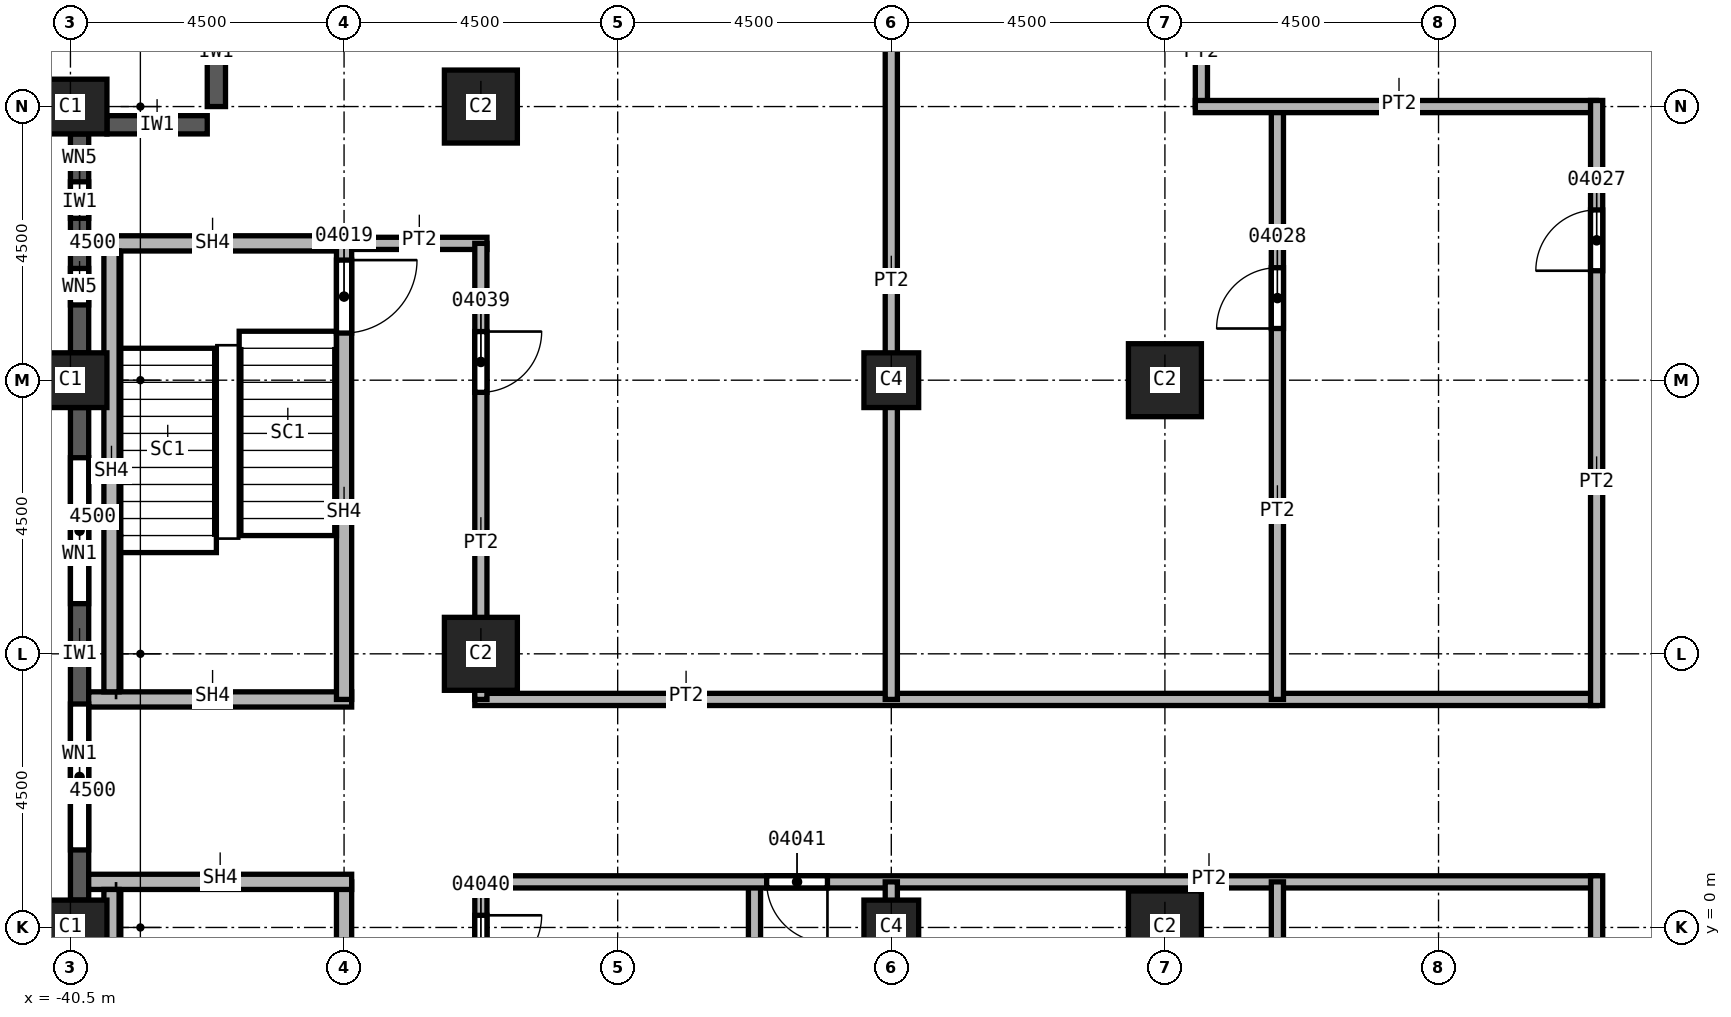
"""IFC4 building model, lengths in metres.
Left out: names, types, materials, properties, quantities, classifications, styles, units other than length and angle.
Written with IfcOpenShell. Run it as: python <this file> out.ifc"""

import sys

from ifc_helpers import new_model, si_unit, direction, frame, frame_2d, origin, origin_2d, place, context, subcontext, project, spatial, rectangle, extrude, element, fill, save


model = new_model("IFC4")
c1 = context("Model", 3, precision=1e-05, world=origin(), true_north=direction((0.0, 1.0)))
c2 = subcontext(c1, "Body", "Model", "MODEL_VIEW")
j1 = project(units=[si_unit("LENGTHUNIT", "METRE"), si_unit("PLANEANGLEUNIT", "RADIAN")], contexts=[c1])
p1 = place(None, origin())
s1 = spatial("IfcSite", under=j1, at=p1, CompositionType="ELEMENT")
p2 = place(p1, origin())
s2 = spatial("IfcBuilding", under=s1, at=p2, CompositionType="ELEMENT")
p3 = place(p2, frame((0.0, 0.0, 104.0)))
s3 = spatial("IfcBuildingStorey", under=s2, at=p3, CompositionType="ELEMENT", Elevation=104.0)
for number, where, z_axis, x_axis in (
    (1, (-40.5, 0.0, 0.0), (0.0, 0.0, 1.0), (0.0, 1.0, 0.0)),
    (2, (-40.5, 9.0, 0.0), (0.0, 0.0, 1.0), (0.0, 1.0, 0.0)),
    (3, (-40.5, 13.5, 0.0), (0.0, 0.0, 1.0), (0.0, 1.0, 0.0)),
):
    element("IfcColumn", number, at=place(p3, frame(where, z_axis=z_axis, x_axis=x_axis)), inside=s3, PredefinedType="COLUMN", context=c2, shape_type="SweptSolid", body=[
        extrude(rectangle(XDim=0.9, YDim=1.2, at=origin_2d()), origin(), (0.0, 0.0, 1.0), 3.7),
    ])
for number, where, z_axis, x_axis in (
    (4, (-33.75, 4.5, 0.0), (0.0, 0.0, 1.0), (1.0, 0.0, 0.0)),
    (5, (-33.75, 13.5, 0.0), (0.0, 0.0, 1.0), (1.0, 0.0, 0.0)),
    (6, (-22.5, 0.0, 0.0), (0.0, 0.0, 1.0), (1.0, 0.0, 0.0)),
    (7, (-22.5, 9.0, 0.0), (0.0, 0.0, 1.0), (1.0, 0.0, 0.0)),
):
    element("IfcColumn", number, at=place(p3, frame(where, z_axis=z_axis, x_axis=x_axis)), inside=s3, PredefinedType="COLUMN", context=c2, shape_type="SweptSolid", body=[
        extrude(rectangle(XDim=1.2, YDim=1.2, at=origin_2d()), origin(), (0.0, 0.0, 1.0), 3.7),
    ])
for number, where, z_axis, x_axis in (
    (8, (-27.0, 0.0, 0.0), (0.0, 0.0, 1.0), (1.0, 0.0, 0.0)),
    (9, (-27.0, 9.0, 0.0), (0.0, 0.0, 1.0), (1.0, 0.0, 0.0)),
):
    element("IfcColumn", number, at=place(p3, frame(where, z_axis=z_axis, x_axis=x_axis)), inside=s3, PredefinedType="COLUMN", context=c2, shape_type="SweptSolid", body=[
        extrude(rectangle(XDim=0.9, YDim=0.9, at=origin_2d()), origin(), (0.0, 0.0, 1.0), 3.7),
    ])
p4 = place(p3, frame((-38.1, 15.3, 0.0), z_axis=(0.0, 0.0, 1.0), x_axis=(0.0, -1.0, 0.0)))
e10 = element("IfcWall", 10, at=p4, inside=s3, PredefinedType="SOLIDWALL", context=c2, shape_type="SweptSolid", body=[
    extrude(rectangle(XDim=1.8, YDim=0.3, at=frame_2d((0.9, 0.0))), origin(), (0.0, 0.0, 1.0), 3.1),
])
p5 = place(p3, frame((-39.9, 13.2, 0.0), z_axis=(0.0, 0.0, 1.0), x_axis=(1.0, 0.0, 0.0)))
e11 = element("IfcWall", 11, at=p5, inside=s3, PredefinedType="SOLIDWALL", context=c2, shape_type="SweptSolid", body=[
    extrude(rectangle(XDim=1.65, YDim=0.3, at=frame_2d((0.825, 0.0))), origin(), (0.0, 0.0, 1.0), 3.1),
])
p6 = place(p3, frame((-40.35, 13.05, 0.0), z_axis=(0.0, 0.0, 1.0), x_axis=(0.0, -1.0, 0.0)))
e12 = element("IfcWall", 12, at=p6, inside=s3, PredefinedType="SOLIDWALL", context=c2, shape_type="SweptSolid", body=[
    extrude(rectangle(XDim=3.6, YDim=0.3, at=frame_2d((1.8, 0.0))), origin(), (0.0, 0.0, 1.0), 3.1),
])
p7 = place(p6, frame((0.788, 0.0, 0.8)))
e13 = element("IfcOpeningElement", 13, at=p7, cuts=e12, PredefinedType="OPENING", context=c2, shape_type="SweptSolid", body=[
    extrude(rectangle(XDim=0.6, YDim=1.95, at=frame_2d((0.3, 0.975))), frame((0.0, 0.15, 0.0), z_axis=(0.0, -1.0, 0.0), x_axis=(1.0, 0.0, 0.0)), (0.0, 0.0, 1.0), 0.3),
])
p8 = place(p6, frame((2.212, 0.0, 0.8)))
e14 = element("IfcOpeningElement", 14, at=p8, cuts=e12, PredefinedType="OPENING", context=c2, shape_type="SweptSolid", body=[
    extrude(rectangle(XDim=0.6, YDim=1.95, at=frame_2d((0.3, 0.975))), frame((0.0, 0.15, 0.0), z_axis=(0.0, -1.0, 0.0), x_axis=(1.0, 0.0, 0.0)), (0.0, 0.0, 1.0), 0.3),
])
p9 = place(p3, frame((-40.35, 8.55, 0.0), z_axis=(0.0, 0.0, 1.0), x_axis=(0.0, -1.0, 0.0)))
e15 = element("IfcWall", 15, at=p9, inside=s3, PredefinedType="SOLIDWALL", context=c2, shape_type="SweptSolid", body=[
    extrude(rectangle(XDim=8.1, YDim=0.3, at=frame_2d((4.05, 0.0))), origin(), (0.0, 0.0, 1.0), 3.1),
])
p10 = place(p9, frame((0.825, 0.0, 0.8)))
e16 = element("IfcOpeningElement", 16, at=p10, cuts=e15, PredefinedType="OPENING", context=c2, shape_type="SweptSolid", body=[
    extrude(rectangle(XDim=2.4, YDim=1.95, at=frame_2d((1.2, 0.975))), frame((0.0, 0.15, 0.0), z_axis=(0.0, -1.0, 0.0), x_axis=(1.0, 0.0, 0.0)), (0.0, 0.0, 1.0), 0.3),
])
p11 = place(p9, frame((4.875, 0.0, 0.8)))
e17 = element("IfcOpeningElement", 17, at=p11, cuts=e15, PredefinedType="OPENING", context=c2, shape_type="SweptSolid", body=[
    extrude(rectangle(XDim=2.4, YDim=1.95, at=frame_2d((1.2, 0.975))), frame((0.0, 0.15, 0.0), z_axis=(0.0, -1.0, 0.0), x_axis=(1.0, 0.0, 0.0)), (0.0, 0.0, 1.0), 0.3),
])
p12 = place(p3, frame((-36.0, 11.25, 0.0), z_axis=(0.0, 0.0, 1.0), x_axis=(1.0, 0.0, 0.0)))
e18 = element("IfcWall", 18, at=p12, inside=s3, PredefinedType="PARTITIONING", context=c2, shape_type="SweptSolid", body=[
    extrude(rectangle(XDim=2.35, YDim=0.2, at=frame_2d((1.175, 0.0))), origin(), (0.0, 0.0, 1.0), 3.7),
])
p13 = place(p3, frame((-33.85, 3.75, 0.0), z_axis=(0.0, 0.0, 1.0), x_axis=(1.0, 0.0, 0.0)))
e19 = element("IfcWall", 19, at=p13, inside=s3, PredefinedType="PARTITIONING", context=c2, shape_type="SweptSolid", body=[
    extrude(rectangle(XDim=18.45, YDim=0.2, at=frame_2d((9.225, 0.0))), origin(), (0.0, 0.0, 1.0), 3.7),
])
p14 = place(p3, frame((-33.75, 0.75, 0.0), z_axis=(0.0, 0.0, 1.0), x_axis=(0.0, -1.0, 0.0)))
e20 = element("IfcWall", 20, at=p14, inside=s3, PredefinedType="PARTITIONING", context=c2, shape_type="SweptSolid", body=[
    extrude(rectangle(XDim=7.6, YDim=0.2, at=frame_2d((3.8, 0.0))), origin(), (0.0, 0.0, 1.0), 3.7),
])
p15 = place(p14, frame((0.55, 0.0, 0.0)))
e21 = element("IfcOpeningElement", 21, at=p15, cuts=e20, PredefinedType="OPENING", context=c2, shape_type="SweptSolid", body=[
    extrude(rectangle(XDim=1.0, YDim=2.1, at=frame_2d((0.5, 1.05))), frame((0.0, 0.1, 0.0), z_axis=(0.0, -1.0, 0.0), x_axis=(1.0, 0.0, 0.0)), (0.0, 0.0, 1.0), 0.2),
])
p16 = place(p3, frame((-33.75, 11.25, 0.0), z_axis=(0.0, 0.0, 1.0), x_axis=(0.0, -1.0, 0.0)))
e22 = element("IfcWall", 22, at=p16, inside=s3, PredefinedType="PARTITIONING", context=c2, shape_type="SweptSolid", body=[
    extrude(rectangle(XDim=7.5, YDim=0.2, at=frame_2d((3.75, 0.0))), origin(), (0.0, 0.0, 1.0), 3.7),
])
p17 = place(p16, frame((1.45, 0.0, 0.0)))
e23 = element("IfcOpeningElement", 23, at=p17, cuts=e22, PredefinedType="OPENING", context=c2, shape_type="SweptSolid", body=[
    extrude(rectangle(XDim=1.0, YDim=2.1, at=frame_2d((0.5, 1.05))), frame((0.0, 0.1, 0.0), z_axis=(0.0, -1.0, 0.0), x_axis=(1.0, 0.0, 0.0)), (0.0, 0.0, 1.0), 0.2),
])
p18 = place(p3, frame((-29.25, 0.75, 0.0), z_axis=(0.0, 0.0, 1.0), x_axis=(0.0, -1.0, 0.0)))
e24 = element("IfcWall", 24, at=p18, inside=s3, PredefinedType="PARTITIONING", context=c2, shape_type="SweptSolid", body=[
    extrude(rectangle(XDim=18.45, YDim=0.2, at=frame_2d((9.225, 0.0))), origin(), (0.0, 0.0, 1.0), 3.7),
])
p19 = place(p3, frame((-15.4, 0.75, 0.0), z_axis=(0.0, 0.0, 1.0), x_axis=(-1.0, 0.0, 0.0)))
e25 = element("IfcWall", 25, at=p19, inside=s3, PredefinedType="PARTITIONING", context=c2, shape_type="SweptSolid", body=[
    extrude(rectangle(XDim=18.45, YDim=0.2, at=frame_2d((9.225, 0.0))), origin(), (0.0, 0.0, 1.0), 3.7),
])
p20 = place(p19, frame((12.65, 0.0, 0.0)))
e26 = element("IfcOpeningElement", 26, at=p20, cuts=e25, PredefinedType="OPENING", context=c2, shape_type="SweptSolid", body=[
    extrude(rectangle(XDim=1.0, YDim=2.1, at=frame_2d((0.5, 1.05))), frame((0.0, 0.1, 0.0), z_axis=(0.0, -1.0, 0.0), x_axis=(1.0, 0.0, 0.0)), (0.0, 0.0, 1.0), 0.2),
])
p21 = place(p3, frame((-27.0, -17.4, 0.0), z_axis=(0.0, 0.0, 1.0), x_axis=(0.0, 1.0, 0.0)))
e27 = element("IfcWall", 27, at=p21, inside=s3, PredefinedType="PARTITIONING", context=c2, shape_type="SweptSolid", body=[
    extrude(rectangle(XDim=18.15, YDim=0.2, at=frame_2d((9.075, 0.0))), origin(), (0.0, 0.0, 1.0), 3.7),
])
p22 = place(p3, frame((-27.0, 3.75, 0.0), z_axis=(0.0, 0.0, 1.0), x_axis=(0.0, 1.0, 0.0)))
e28 = element("IfcWall", 28, at=p22, inside=s3, PredefinedType="PARTITIONING", context=c2, shape_type="SweptSolid", body=[
    extrude(rectangle(XDim=13.65, YDim=0.2, at=frame_2d((6.825, 0.0))), origin(), (0.0, 0.0, 1.0), 3.7),
])
p23 = place(p3, frame((-21.9, 13.5, 0.0), z_axis=(0.0, 0.0, 1.0), x_axis=(0.0, 1.0, 0.0)))
e29 = element("IfcWall", 29, at=p23, inside=s3, PredefinedType="PARTITIONING", context=c2, shape_type="SweptSolid", body=[
    extrude(rectangle(XDim=1.7, YDim=0.2, at=frame_2d((0.85, 0.0))), origin(), (0.0, 0.0, 1.0), 3.7),
])
p24 = place(p3, frame((-20.65, -20.25, 0.0), z_axis=(0.0, 0.0, 1.0), x_axis=(0.0, 1.0, 0.0)))
e30 = element("IfcWall", 30, at=p24, inside=s3, PredefinedType="PARTITIONING", context=c2, shape_type="SweptSolid", body=[
    extrude(rectangle(XDim=21.0, YDim=0.2, at=frame_2d((10.5, 0.0))), origin(), (0.0, 0.0, 1.0), 3.7),
])
p25 = place(p24, frame((9.1, 0.0, 0.0)))
e31 = element("IfcOpeningElement", 31, at=p25, cuts=e30, PredefinedType="OPENING", context=c2, shape_type="SweptSolid", body=[
    extrude(rectangle(XDim=1.0, YDim=2.1, at=frame_2d((0.5, 1.05))), frame((0.0, 0.1, 0.0), z_axis=(0.0, -1.0, 0.0), x_axis=(1.0, 0.0, 0.0)), (0.0, 0.0, 1.0), 0.2),
])
p26 = place(p3, frame((-20.65, 3.75, 0.0), z_axis=(0.0, 0.0, 1.0), x_axis=(0.0, 1.0, 0.0)))
e32 = element("IfcWall", 32, at=p26, inside=s3, PredefinedType="PARTITIONING", context=c2, shape_type="SweptSolid", body=[
    extrude(rectangle(XDim=9.75, YDim=0.2, at=frame_2d((4.875, 0.0))), origin(), (0.0, 0.0, 1.0), 3.7),
])
p27 = place(p26, frame((6.1, 0.0, 0.0)))
e33 = element("IfcOpeningElement", 33, at=p27, cuts=e32, PredefinedType="OPENING", context=c2, shape_type="SweptSolid", body=[
    extrude(rectangle(XDim=1.0, YDim=2.1, at=frame_2d((0.5, 1.05))), frame((0.0, 0.1, 0.0), z_axis=(0.0, -1.0, 0.0), x_axis=(1.0, 0.0, 0.0)), (0.0, 0.0, 1.0), 0.2),
])
p28 = place(p3, frame((-15.4, 13.5, 0.0), z_axis=(0.0, 0.0, 1.0), x_axis=(-1.0, 0.0, 0.0)))
e34 = element("IfcWall", 34, at=p28, inside=s3, PredefinedType="PARTITIONING", context=c2, shape_type="SweptSolid", body=[
    extrude(rectangle(XDim=6.6, YDim=0.2, at=frame_2d((3.3, 0.0))), origin(), (0.0, 0.0, 1.0), 3.7),
])
p29 = place(p3, frame((-15.4, -24.5, 0.0), z_axis=(0.0, 0.0, 1.0), x_axis=(0.0, 1.0, 0.0)))
e35 = element("IfcWall", 35, at=p29, inside=s3, PredefinedType="PARTITIONING", context=c2, shape_type="SweptSolid", body=[
    extrude(rectangle(XDim=25.35, YDim=0.2, at=frame_2d((12.675, 0.0))), origin(), (0.0, 0.0, 1.0), 3.7),
])
p30 = place(p29, frame((2.65, 0.0, 0.0)))
e36 = element("IfcOpeningElement", 36, at=p30, cuts=e35, PredefinedType="OPENING", context=c2, shape_type="SweptSolid", body=[
    extrude(rectangle(XDim=1.0, YDim=2.1, at=frame_2d((0.5, 1.05))), frame((0.0, 0.1, 0.0), z_axis=(0.0, -1.0, 0.0), x_axis=(1.0, 0.0, 0.0)), (0.0, 0.0, 1.0), 0.2),
])
p31 = place(p29, frame((14.3, 0.0, 0.0)))
e37 = element("IfcOpeningElement", 37, at=p31, cuts=e35, PredefinedType="OPENING", context=c2, shape_type="SweptSolid", body=[
    extrude(rectangle(XDim=1.0, YDim=2.1, at=frame_2d((0.5, 1.05))), frame((0.0, 0.1, 0.0), z_axis=(0.0, -1.0, 0.0), x_axis=(1.0, 0.0, 0.0)), (0.0, 0.0, 1.0), 0.2),
])
p32 = place(p3, frame((-15.4, 3.65, 0.0), z_axis=(0.0, 0.0, 1.0), x_axis=(0.0, 1.0, 0.0)))
e38 = element("IfcWall", 38, at=p32, inside=s3, PredefinedType="PARTITIONING", context=c2, shape_type="SweptSolid", body=[
    extrude(rectangle(XDim=9.95, YDim=0.2, at=frame_2d((4.975, 0.0))), origin(), (0.0, 0.0, 1.0), 3.7),
])
p33 = place(p32, frame((7.15, 0.0, 0.0)))
e39 = element("IfcOpeningElement", 39, at=p33, cuts=e38, PredefinedType="OPENING", context=c2, shape_type="SweptSolid", body=[
    extrude(rectangle(XDim=1.0, YDim=2.1, at=frame_2d((0.5, 1.05))), frame((0.0, 0.1, 0.0), z_axis=(0.0, -1.0, 0.0), x_axis=(1.0, 0.0, 0.0)), (0.0, 0.0, 1.0), 0.2),
])
p34 = place(p3, frame((-40.2, 3.75, 0.0), z_axis=(0.0, 0.0, 1.0), x_axis=(1.0, 0.0, 0.0)))
e40 = element("IfcWall", 40, at=p34, inside=s3, PredefinedType="SOLIDWALL", context=c2, shape_type="SweptSolid", body=[
    extrude(rectangle(XDim=4.325, YDim=0.25, at=frame_2d((2.163, 0.0))), origin(), (0.0, 0.0, 1.0), 3.7),
])
p35 = place(p3, frame((-40.2, 11.25, 0.0), z_axis=(0.0, 0.0, 1.0), x_axis=(1.0, 0.0, 0.0)))
e41 = element("IfcWall", 41, at=p35, inside=s3, PredefinedType="SOLIDWALL", context=c2, shape_type="SweptSolid", body=[
    extrude(rectangle(XDim=4.2, YDim=0.25, at=frame_2d((2.1, 0.0))), origin(), (0.0, 0.0, 1.0), 3.7),
])
p36 = place(p3, frame((-36.0, 0.75, 0.0), z_axis=(0.0, 0.0, 1.0), x_axis=(0.0, -1.0, 0.0)))
e42 = element("IfcWall", 42, at=p36, inside=s3, PredefinedType="SOLIDWALL", context=c2, shape_type="SweptSolid", body=[
    extrude(rectangle(XDim=7.625, YDim=0.25, at=frame_2d((3.812, 0.0))), origin(), (0.0, 0.0, 1.0), 3.7),
])
p37 = place(p36, frame((5.95, 0.0, 0.0)))
e43 = element("IfcOpeningElement", 43, at=p37, cuts=e42, PredefinedType="OPENING", context=c2, shape_type="SweptSolid", body=[
    extrude(rectangle(XDim=1.2, YDim=2.1, at=frame_2d((0.6, 1.05))), frame((0.0, 0.125, 0.0), z_axis=(0.0, -1.0, 0.0), x_axis=(1.0, 0.0, 0.0)), (0.0, 0.0, 1.0), 0.25),
])
p38 = place(p3, frame((-36.0, 11.375, 0.0), z_axis=(0.0, 0.0, 1.0), x_axis=(0.0, -1.0, 0.0)))
e44 = element("IfcWall", 44, at=p38, inside=s3, PredefinedType="SOLIDWALL", context=c2, shape_type="SweptSolid", body=[
    extrude(rectangle(XDim=7.625, YDim=0.25, at=frame_2d((3.812, 0.0))), origin(), (0.0, 0.0, 1.0), 3.7),
])
p39 = place(p38, frame((0.4, 0.0, 0.0)))
e45 = element("IfcOpeningElement", 45, at=p39, cuts=e44, PredefinedType="OPENING", context=c2, shape_type="SweptSolid", body=[
    extrude(rectangle(XDim=1.2, YDim=2.1, at=frame_2d((0.6, 1.05))), frame((0.0, 0.125, 0.0), z_axis=(0.0, -1.0, 0.0), x_axis=(1.0, 0.0, 0.0)), (0.0, 0.0, 1.0), 0.25),
])
p40 = place(p3, frame((-35.875, 0.75, 0.0), z_axis=(0.0, 0.0, 1.0), x_axis=(-1.0, 0.0, 0.0)))
e46 = element("IfcWall", 46, at=p40, inside=s3, PredefinedType="SOLIDWALL", context=c2, shape_type="SweptSolid", body=[
    extrude(rectangle(XDim=4.325, YDim=0.25, at=frame_2d((2.163, 0.0))), origin(), (0.0, 0.0, 1.0), 3.7),
])
for number, where, z_axis, x_axis in (
    (47, (-39.825, 3.875, 0.0), (0.0, 0.0, 1.0), (0.0, 1.0, 0.0)),
    (48, (-39.825, -6.625, 0.0), (0.0, 0.0, 1.0), (0.0, 1.0, 0.0)),
):
    element("IfcWall", number, at=place(p3, frame(where, z_axis=z_axis, x_axis=x_axis)), inside=s3, PredefinedType="SOLIDWALL", context=c2, shape_type="SweptSolid", body=[
        extrude(rectangle(XDim=7.25, YDim=0.25, at=frame_2d((3.625, 0.0))), origin(), (0.0, 0.0, 1.0), 3.7),
    ])
p41 = place(p10, origin())
e49 = element("IfcWindow", 49, at=p41, inside=s3, PartitioningType="SINGLE_PANEL", PredefinedType="WINDOW", context=c2, shape_type="SweptSolid", body=[
    extrude(rectangle(XDim=2.4, YDim=1.95, at=frame_2d((1.2, 0.975))), frame((0.0, 0.03, 0.0), z_axis=(0.0, -1.0, 0.0), x_axis=(1.0, 0.0, 0.0)), (0.0, 0.0, 1.0), 0.06),
])
fill(e16, e49)
p42 = place(p11, origin())
e50 = element("IfcWindow", 50, at=p42, inside=s3, PartitioningType="SINGLE_PANEL", PredefinedType="WINDOW", context=c2, shape_type="SweptSolid", body=[
    extrude(rectangle(XDim=2.4, YDim=1.95, at=frame_2d((1.2, 0.975))), frame((0.0, 0.03, 0.0), z_axis=(0.0, -1.0, 0.0), x_axis=(1.0, 0.0, 0.0)), (0.0, 0.0, 1.0), 0.06),
])
fill(e17, e50)
p43 = place(p39, origin())
e51 = element("IfcDoor", 51, at=p43, inside=s3, OperationType="SINGLE_SWING_RIGHT", PredefinedType="DOOR", context=c2, shape_type="SweptSolid", body=[
    extrude(rectangle(XDim=1.2, YDim=2.1, at=frame_2d((0.6, 1.05))), frame((0.0, 0.025, 0.0), z_axis=(0.0, -1.0, 0.0), x_axis=(1.0, 0.0, 0.0)), (0.0, 0.0, 1.0), 0.05),
])
fill(e45, e51)
p44 = place(p33, origin())
e52 = element("IfcDoor", 52, at=p44, inside=s3, OperationType="SINGLE_SWING_RIGHT", PredefinedType="DOOR", context=c2, shape_type="SweptSolid", body=[
    extrude(rectangle(XDim=1.0, YDim=2.1, at=frame_2d((0.5, 1.05))), frame((0.0, 0.025, 0.0), z_axis=(0.0, -1.0, 0.0), x_axis=(1.0, 0.0, 0.0)), (0.0, 0.0, 1.0), 0.05),
])
fill(e39, e52)
p45 = place(p27, origin())
e53 = element("IfcDoor", 53, at=p45, inside=s3, OperationType="SINGLE_SWING_LEFT", PredefinedType="DOOR", context=c2, shape_type="SweptSolid", body=[
    extrude(rectangle(XDim=1.0, YDim=2.1, at=frame_2d((0.5, 1.05))), frame((0.0, 0.025, 0.0), z_axis=(0.0, -1.0, 0.0), x_axis=(1.0, 0.0, 0.0)), (0.0, 0.0, 1.0), 0.05),
])
fill(e33, e53)
p46 = place(p17, origin())
e54 = element("IfcDoor", 54, at=p46, inside=s3, OperationType="SINGLE_SWING_RIGHT", PredefinedType="DOOR", context=c2, shape_type="SweptSolid", body=[
    extrude(rectangle(XDim=1.0, YDim=2.1, at=frame_2d((0.5, 1.05))), frame((0.0, 0.025, 0.0), z_axis=(0.0, -1.0, 0.0), x_axis=(1.0, 0.0, 0.0)), (0.0, 0.0, 1.0), 0.05),
])
fill(e23, e54)
p47 = place(p15, origin())
e55 = element("IfcDoor", 55, at=p47, inside=s3, OperationType="SINGLE_SWING_LEFT", PredefinedType="DOOR", context=c2, shape_type="SweptSolid", body=[
    extrude(rectangle(XDim=1.0, YDim=2.1, at=frame_2d((0.5, 1.05))), frame((0.0, 0.025, 0.0), z_axis=(0.0, -1.0, 0.0), x_axis=(1.0, 0.0, 0.0)), (0.0, 0.0, 1.0), 0.05),
])
fill(e21, e55)
p48 = place(p20, origin())
e56 = element("IfcDoor", 56, at=p48, inside=s3, OperationType="SINGLE_SWING_RIGHT", PredefinedType="DOOR", context=c2, shape_type="SweptSolid", body=[
    extrude(rectangle(XDim=1.0, YDim=2.1, at=frame_2d((0.5, 1.05))), frame((0.0, 0.025, 0.0), z_axis=(0.0, -1.0, 0.0), x_axis=(1.0, 0.0, 0.0)), (0.0, 0.0, 1.0), 0.05),
])
fill(e26, e56)
p49 = place(p7, origin())
e57 = element("IfcWindow", 57, at=p49, inside=s3, PartitioningType="SINGLE_PANEL", PredefinedType="WINDOW", context=c2, shape_type="SweptSolid", body=[
    extrude(rectangle(XDim=0.6, YDim=1.95, at=frame_2d((0.3, 0.975))), frame((0.0, 0.03, 0.0), z_axis=(0.0, -1.0, 0.0), x_axis=(1.0, 0.0, 0.0)), (0.0, 0.0, 1.0), 0.06),
])
fill(e13, e57)
p50 = place(p8, origin())
e58 = element("IfcWindow", 58, at=p50, inside=s3, PartitioningType="SINGLE_PANEL", PredefinedType="WINDOW", context=c2, shape_type="SweptSolid", body=[
    extrude(rectangle(XDim=0.6, YDim=1.95, at=frame_2d((0.3, 0.975))), frame((0.0, 0.03, 0.0), z_axis=(0.0, -1.0, 0.0), x_axis=(1.0, 0.0, 0.0)), (0.0, 0.0, 1.0), 0.06),
])
fill(e14, e58)
save(model, sys.argv[1])
